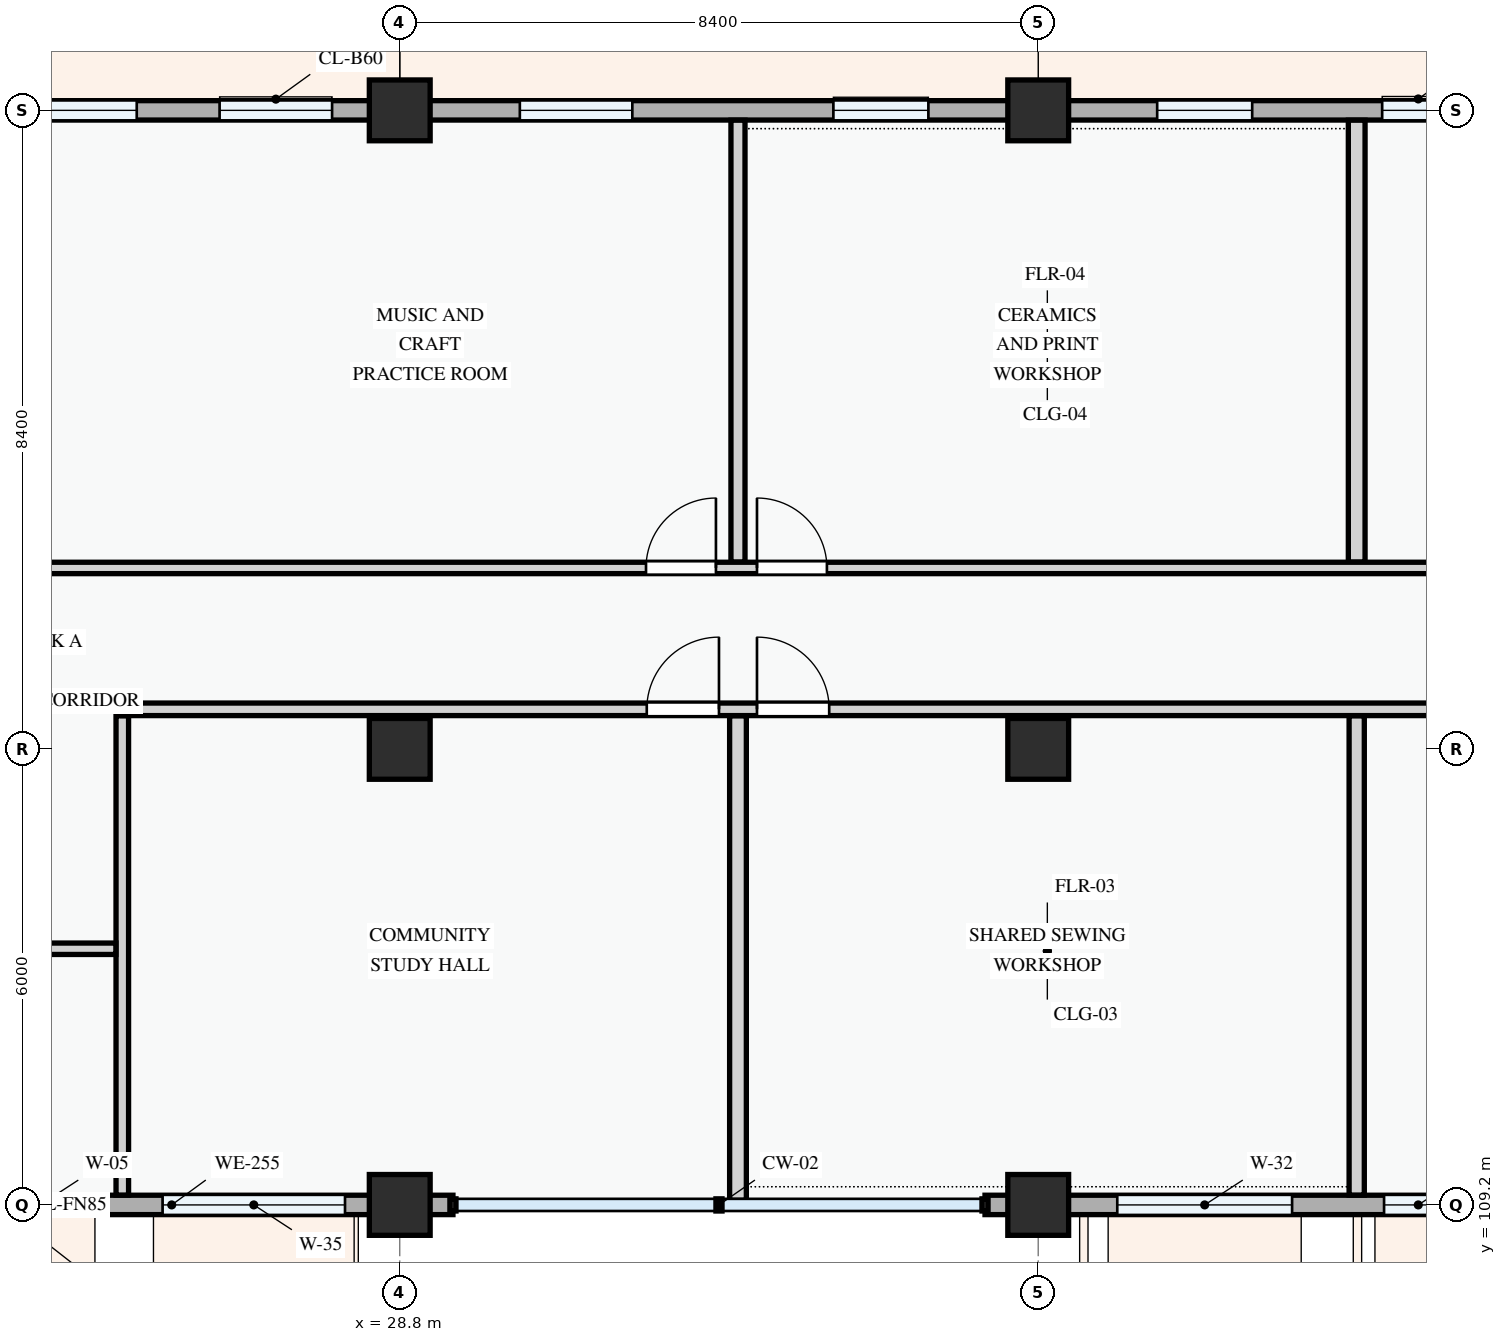
"""IFC4 building model, lengths in metres.
Left out: names, types, materials, properties, quantities, classifications, styles, units other than length and angle.
Written with IfcOpenShell. Run it as: python <this file> out.ifc"""

import sys

from ifc_helpers import new_model, si_unit, direction, frame, frame_2d, origin, origin_2d, place, context, subcontext, project, spatial, rectangle, extrude, element, fill, save


model = new_model("IFC4")
c1 = context("Model", 3, precision=1e-05, world=origin(), true_north=direction((0.0, 1.0)))
c2 = subcontext(c1, "Body", "Model", "MODEL_VIEW")
j1 = project(units=[si_unit("LENGTHUNIT", "METRE"), si_unit("PLANEANGLEUNIT", "RADIAN")], contexts=[c1])
p1 = place(None, origin())
s1 = spatial("IfcSite", under=j1, at=p1, CompositionType="ELEMENT")
p2 = place(p1, origin())
s2 = spatial("IfcBuilding", under=s1, at=p2, CompositionType="ELEMENT")
p3 = place(p2, frame((0.0, 0.0, 4.5)))
s3 = spatial("IfcBuildingStorey", under=s2, at=p3, CompositionType="ELEMENT", Elevation=4.5)
for number, where, z_axis, x_axis in (
    (1, (28.8, 109.2, 0.0), (0.0, 0.0, 1.0), (1.0, 0.0, 0.0)),
    (2, (28.8, 115.2, 0.0), (0.0, 0.0, 1.0), (1.0, 0.0, 0.0)),
    (3, (28.8, 123.6, 0.0), (0.0, 0.0, 1.0), (1.0, 0.0, 0.0)),
    (4, (37.2, 109.2, 0.0), (0.0, 0.0, 1.0), (1.0, 0.0, 0.0)),
    (5, (37.2, 115.2, 0.0), (0.0, 0.0, 1.0), (1.0, 0.0, 0.0)),
    (6, (37.2, 123.6, 0.0), (0.0, 0.0, 1.0), (1.0, 0.0, 0.0)),
):
    element("IfcColumn", number, at=place(p3, frame(where, z_axis=z_axis, x_axis=x_axis)), inside=s3, PredefinedType="COLUMN", context=c2, shape_type="SweptSolid", body=[
        extrude(rectangle(XDim=0.8, YDim=0.8, at=origin_2d()), origin(), (0.0, 0.0, 1.0), 3.6),
    ])
p4 = place(p3, frame((22.8, 109.2, 0.0), z_axis=(0.0, 0.0, 1.0), x_axis=(1.0, 0.0, 0.0)))
e7 = element("IfcWall", 7, at=p4, inside=s3, PredefinedType="STANDARD", context=c2, shape_type="SweptSolid", body=[
    extrude(rectangle(XDim=6.0, YDim=0.255, at=frame_2d((3.0, 0.0))), origin(), (0.0, 0.0, 1.0), 2.775),
])
p5 = place(p4, frame((0.67, 0.0, 0.78)))
e8 = element("IfcOpeningElement", 8, at=p5, cuts=e7, PredefinedType="OPENING", context=c2, shape_type="SweptSolid", body=[
    extrude(rectangle(XDim=1.2, YDim=1.5, at=frame_2d((0.6, 0.75))), frame((0.0, 0.137, 0.0), z_axis=(0.0, -1.0, 0.0), x_axis=(1.0, 0.0, 0.0)), (0.0, 0.0, 1.0), 0.275),
])
p6 = place(p4, frame((2.88, 0.0, 0.78)))
e9 = element("IfcOpeningElement", 9, at=p6, cuts=e7, PredefinedType="OPENING", context=c2, shape_type="SweptSolid", body=[
    extrude(rectangle(XDim=2.4, YDim=1.85, at=frame_2d((1.2, 0.925))), frame((0.0, 0.137, 0.0), z_axis=(0.0, -1.0, 0.0), x_axis=(1.0, 0.0, 0.0)), (0.0, 0.0, 1.0), 0.275),
])
for number, where, z_axis, x_axis in (
    (10, (28.8, 109.2, 0.0), (0.0, 0.0, 1.0), (1.0, 0.0, 0.0)),
    (11, (36.5, 109.2, 0.0), (0.0, 0.0, 1.0), (1.0, 0.0, 0.0)),
):
    element("IfcWall", number, at=place(p3, frame(where, z_axis=z_axis, x_axis=x_axis)), inside=s3, PredefinedType="STANDARD", context=c2, shape_type="SweptSolid", body=[
        extrude(rectangle(XDim=0.7, YDim=0.255, at=frame_2d((0.35, 0.0))), origin(), (0.0, 0.0, 1.0), 2.675),
    ])
p7 = place(p3, frame((37.2, 109.2, 0.0), z_axis=(0.0, 0.0, 1.0), x_axis=(1.0, 0.0, 0.0)))
e12 = element("IfcWall", 12, at=p7, inside=s3, PredefinedType="STANDARD", context=c2, shape_type="SweptSolid", body=[
    extrude(rectangle(XDim=6.0, YDim=0.255, at=frame_2d((3.0, 0.0))), origin(), (0.0, 0.0, 1.0), 2.775),
])
p8 = place(p7, frame((1.04, 0.0, 0.78)))
e13 = element("IfcOpeningElement", 13, at=p8, cuts=e12, PredefinedType="OPENING", context=c2, shape_type="SweptSolid", body=[
    extrude(rectangle(XDim=2.3, YDim=1.7, at=frame_2d((1.15, 0.85))), frame((0.0, 0.137, 0.0), z_axis=(0.0, -1.0, 0.0), x_axis=(1.0, 0.0, 0.0)), (0.0, 0.0, 1.0), 0.275),
])
p9 = place(p7, frame((4.55, 0.0, 0.78)))
e14 = element("IfcOpeningElement", 14, at=p9, cuts=e12, PredefinedType="OPENING", context=c2, shape_type="SweptSolid", body=[
    extrude(rectangle(XDim=0.9, YDim=1.2, at=frame_2d((0.45, 0.6))), frame((0.0, 0.137, 0.0), z_axis=(0.0, -1.0, 0.0), x_axis=(1.0, 0.0, 0.0)), (0.0, 0.0, 1.0), 0.275),
])
p10 = place(p3, frame((43.2, 123.6, 0.0), z_axis=(0.0, 0.0, 1.0), x_axis=(-1.0, 0.0, 0.0)))
e15 = element("IfcWall", 15, at=p10, inside=s3, PredefinedType="STANDARD", context=c2, shape_type="SweptSolid", body=[
    extrude(rectangle(XDim=6.0, YDim=0.255, at=frame_2d((3.0, 0.0))), origin(), (0.0, 0.0, 1.0), 2.775),
])
p11 = place(p10, frame((0.525, 0.0, 0.78)))
e16 = element("IfcOpeningElement", 16, at=p11, cuts=e15, PredefinedType="OPENING", context=c2, shape_type="SweptSolid", body=[
    extrude(rectangle(XDim=0.95, YDim=1.15, at=frame_2d((0.475, 0.575))), frame((0.0, 0.137, 0.0), z_axis=(0.0, -1.0, 0.0), x_axis=(1.0, 0.0, 0.0)), (0.0, 0.0, 1.0), 0.275),
])
p12 = place(p10, frame((3.185, 0.0, 0.78)))
e17 = element("IfcOpeningElement", 17, at=p12, cuts=e15, PredefinedType="OPENING", context=c2, shape_type="SweptSolid", body=[
    extrude(rectangle(XDim=1.25, YDim=1.45, at=frame_2d((0.625, 0.725))), frame((0.0, 0.137, 0.0), z_axis=(0.0, -1.0, 0.0), x_axis=(1.0, 0.0, 0.0)), (0.0, 0.0, 1.0), 0.275),
])
p13 = place(p3, frame((37.2, 123.6, 0.0), z_axis=(0.0, 0.0, 1.0), x_axis=(-1.0, 0.0, 0.0)))
e18 = element("IfcWall", 18, at=p13, inside=s3, PredefinedType="STANDARD", context=c2, shape_type="SweptSolid", body=[
    extrude(rectangle(XDim=8.4, YDim=0.255, at=frame_2d((4.2, 0.0))), origin(), (0.0, 0.0, 1.0), 2.675),
])
p14 = place(p13, frame((1.445, 0.0, 0.78)))
e19 = element("IfcOpeningElement", 19, at=p14, cuts=e18, PredefinedType="OPENING", context=c2, shape_type="SweptSolid", body=[
    extrude(rectangle(XDim=1.25, YDim=1.3, at=frame_2d((0.625, 0.65))), frame((0.0, 0.137, 0.0), z_axis=(0.0, -1.0, 0.0), x_axis=(1.0, 0.0, 0.0)), (0.0, 0.0, 1.0), 0.275),
])
p15 = place(p13, frame((5.34, 0.0, 0.78)))
e20 = element("IfcOpeningElement", 20, at=p15, cuts=e18, PredefinedType="OPENING", context=c2, shape_type="SweptSolid", body=[
    extrude(rectangle(XDim=1.48, YDim=1.52, at=frame_2d((0.74, 0.76))), frame((0.0, 0.137, 0.0), z_axis=(0.0, -1.0, 0.0), x_axis=(1.0, 0.0, 0.0)), (0.0, 0.0, 1.0), 0.275),
])
p16 = place(p3, frame((28.8, 123.6, 0.0), z_axis=(0.0, 0.0, 1.0), x_axis=(-1.0, 0.0, 0.0)))
e21 = element("IfcWall", 21, at=p16, inside=s3, PredefinedType="STANDARD", context=c2, shape_type="SweptSolid", body=[
    extrude(rectangle(XDim=6.0, YDim=0.255, at=frame_2d((3.0, 0.0))), origin(), (0.0, 0.0, 1.0), 2.775),
])
p17 = place(p16, frame((0.89, 0.0, 0.78)))
e22 = element("IfcOpeningElement", 22, at=p17, cuts=e21, PredefinedType="OPENING", context=c2, shape_type="SweptSolid", body=[
    extrude(rectangle(XDim=1.48, YDim=1.52, at=frame_2d((0.74, 0.76))), frame((0.0, 0.137, 0.0), z_axis=(0.0, -1.0, 0.0), x_axis=(1.0, 0.0, 0.0)), (0.0, 0.0, 1.0), 0.275),
])
p18 = place(p16, frame((3.46, 0.0, 0.78)))
e23 = element("IfcOpeningElement", 23, at=p18, cuts=e21, PredefinedType="OPENING", context=c2, shape_type="SweptSolid", body=[
    extrude(rectangle(XDim=1.82, YDim=1.46, at=frame_2d((0.91, 0.73))), frame((0.0, 0.137, 0.0), z_axis=(0.0, -1.0, 0.0), x_axis=(1.0, 0.0, 0.0)), (0.0, 0.0, 1.0), 0.275),
])
p19 = place(p3, frame((25.15, 109.33, 0.0), z_axis=(0.0, 0.0, 1.0), x_axis=(0.0, 1.0, 0.0)))
e24 = element("IfcWall", 24, at=p19, inside=s3, PredefinedType="PARTITIONING", context=c2, shape_type="SweptSolid", body=[
    extrude(rectangle(XDim=6.306, YDim=0.165, at=frame_2d((3.153, 0.0))), origin(), (0.0, 0.0, 1.0), 3.3),
])
p20 = place(p3, frame((22.66, 112.57, 0.0), z_axis=(0.0, 0.0, 1.0), x_axis=(1.0, 0.0, 0.0)))
e25 = element("IfcWall", 25, at=p20, inside=s3, PredefinedType="PARTITIONING", context=c2, shape_type="SweptSolid", body=[
    extrude(rectangle(XDim=2.406, YDim=0.15, at=frame_2d((1.203, 0.0))), origin(), (0.0, 0.0, 1.0), 3.3),
])
p21 = place(p3, frame((33.25, 109.26, 0.0), z_axis=(0.0, 0.0, 1.0), x_axis=(0.0, 1.0, 0.0)))
e26 = element("IfcWall", 26, at=p21, inside=s3, PredefinedType="PARTITIONING", context=c2, shape_type="SweptSolid", body=[
    extrude(rectangle(XDim=6.375, YDim=0.22, at=frame_2d((3.188, 0.0))), origin(), (0.0, 0.0, 1.0), 2.885),
])
p22 = place(p3, frame((33.25, 117.657, 0.0), z_axis=(0.0, 0.0, 1.0), x_axis=(0.0, 1.0, 0.0)))
e27 = element("IfcWall", 27, at=p22, inside=s3, PredefinedType="PARTITIONING", context=c2, shape_type="SweptSolid", body=[
    extrude(rectangle(XDim=5.813, YDim=0.185, at=frame_2d((2.907, 0.0))), origin(), (0.0, 0.0, 1.0), 2.885),
])
p23 = place(p3, frame((41.39, 109.33, 0.0), z_axis=(0.0, 0.0, 1.0), x_axis=(0.0, 1.0, 0.0)))
e28 = element("IfcWall", 28, at=p23, inside=s3, PredefinedType="PARTITIONING", context=c2, shape_type="SweptSolid", body=[
    extrude(rectangle(XDim=6.306, YDim=0.2, at=frame_2d((3.153, 0.0))), origin(), (0.0, 0.0, 1.0), 3.3),
])
p24 = place(p3, frame((41.39, 117.657, 0.0), z_axis=(0.0, 0.0, 1.0), x_axis=(0.0, 1.0, 0.0)))
e29 = element("IfcWall", 29, at=p24, inside=s3, PredefinedType="PARTITIONING", context=c2, shape_type="SweptSolid", body=[
    extrude(rectangle(XDim=5.813, YDim=0.22, at=frame_2d((2.907, 0.0))), origin(), (0.0, 0.0, 1.0), 3.3),
])
p25 = place(p3, frame((25.15, 115.72, 0.0), z_axis=(0.0, 0.0, 1.0), x_axis=(1.0, 0.0, 0.0)))
e30 = element("IfcWall", 30, at=p25, inside=s3, PredefinedType="PARTITIONING", context=c2, shape_type="SweptSolid", body=[
    extrude(rectangle(XDim=32.321, YDim=0.165, at=frame_2d((16.16, 0.0))), origin(), (0.0, 0.0, 1.0), 3.3),
])
p26 = place(p25, frame((6.9, 0.0, 0.0)))
e31 = element("IfcOpeningElement", 31, at=p26, cuts=e30, PredefinedType="OPENING", context=c2, shape_type="SweptSolid", body=[
    extrude(rectangle(XDim=0.95, YDim=2.1, at=frame_2d((0.475, 1.05))), frame((0.0, 0.093, 0.0), z_axis=(0.0, -1.0, 0.0), x_axis=(1.0, 0.0, 0.0)), (0.0, 0.0, 1.0), 0.185),
])
p27 = place(p25, frame((8.35, 0.0, 0.0)))
e32 = element("IfcOpeningElement", 32, at=p27, cuts=e30, PredefinedType="OPENING", context=c2, shape_type="SweptSolid", body=[
    extrude(rectangle(XDim=0.95, YDim=2.1, at=frame_2d((0.475, 1.05))), frame((0.0, 0.093, 0.0), z_axis=(0.0, -1.0, 0.0), x_axis=(1.0, 0.0, 0.0)), (0.0, 0.0, 1.0), 0.185),
])
p28 = place(p25, frame((21.718, 0.0, 0.0)))
e33 = element("IfcOpeningElement", 33, at=p28, cuts=e30, PredefinedType="OPENING", context=c2, shape_type="SweptSolid", body=[
    extrude(rectangle(XDim=0.95, YDim=2.1, at=frame_2d((0.475, 1.05))), frame((0.0, 0.093, 0.0), z_axis=(0.0, -1.0, 0.0), x_axis=(1.0, 0.0, 0.0)), (0.0, 0.0, 1.0), 0.185),
])
p29 = place(p25, frame((29.031, 0.0, 0.0)))
e34 = element("IfcOpeningElement", 34, at=p29, cuts=e30, PredefinedType="OPENING", context=c2, shape_type="SweptSolid", body=[
    extrude(rectangle(XDim=0.95, YDim=2.1, at=frame_2d((0.475, 1.05))), frame((0.0, 0.093, 0.0), z_axis=(0.0, -1.0, 0.0), x_axis=(1.0, 0.0, 0.0)), (0.0, 0.0, 1.0), 0.185),
])
p30 = place(p3, frame((22.66, 117.58, 0.0), z_axis=(0.0, 0.0, 1.0), x_axis=(1.0, 0.0, 0.0)))
e35 = element("IfcWall", 35, at=p30, inside=s3, PredefinedType="PARTITIONING", context=c2, shape_type="SweptSolid", body=[
    extrude(rectangle(XDim=34.88, YDim=0.15, at=frame_2d((17.44, 0.0))), origin(), (0.0, 0.0, 1.0), 3.3),
])
p31 = place(p30, frame((9.38, 0.0, 0.0)))
e36 = element("IfcOpeningElement", 36, at=p31, cuts=e35, PredefinedType="OPENING", context=c2, shape_type="SweptSolid", body=[
    extrude(rectangle(XDim=0.92, YDim=2.1, at=frame_2d((0.46, 1.05))), frame((0.0, 0.085, 0.0), z_axis=(0.0, -1.0, 0.0), x_axis=(1.0, 0.0, 0.0)), (0.0, 0.0, 1.0), 0.17),
])
p32 = place(p30, frame((10.84, 0.0, 0.0)))
e37 = element("IfcOpeningElement", 37, at=p32, cuts=e35, PredefinedType="OPENING", context=c2, shape_type="SweptSolid", body=[
    extrude(rectangle(XDim=0.92, YDim=2.1, at=frame_2d((0.46, 1.05))), frame((0.0, 0.085, 0.0), z_axis=(0.0, -1.0, 0.0), x_axis=(1.0, 0.0, 0.0)), (0.0, 0.0, 1.0), 0.17),
])
p33 = place(p30, frame((24.2, 0.0, 0.0)))
e38 = element("IfcOpeningElement", 38, at=p33, cuts=e35, PredefinedType="OPENING", context=c2, shape_type="SweptSolid", body=[
    extrude(rectangle(XDim=0.92, YDim=2.1, at=frame_2d((0.46, 1.05))), frame((0.0, 0.085, 0.0), z_axis=(0.0, -1.0, 0.0), x_axis=(1.0, 0.0, 0.0)), (0.0, 0.0, 1.0), 0.17),
])
p34 = place(p30, frame((31.515, 0.0, 0.0)))
e39 = element("IfcOpeningElement", 39, at=p34, cuts=e35, PredefinedType="OPENING", context=c2, shape_type="SweptSolid", body=[
    extrude(rectangle(XDim=0.92, YDim=2.1, at=frame_2d((0.46, 1.05))), frame((0.0, 0.085, 0.0), z_axis=(0.0, -1.0, 0.0), x_axis=(1.0, 0.0, 0.0)), (0.0, 0.0, 1.0), 0.17),
])
p35 = place(p5, origin())
e40 = element("IfcWindow", 40, at=p35, inside=s3, PartitioningType="SINGLE_PANEL", PredefinedType="WINDOW", context=c2, shape_type="SweptSolid", body=[
    extrude(rectangle(XDim=1.2, YDim=1.5, at=frame_2d((0.6, 0.75))), frame((0.0, 0.03, 0.0), z_axis=(0.0, -1.0, 0.0), x_axis=(1.0, 0.0, 0.0)), (0.0, 0.0, 1.0), 0.06),
])
fill(e8, e40)
p36 = place(p6, origin())
e41 = element("IfcWindow", 41, at=p36, inside=s3, PartitioningType="DOUBLE_PANEL_VERTICAL", PredefinedType="WINDOW", context=c2, shape_type="SweptSolid", body=[
    extrude(rectangle(XDim=2.4, YDim=1.85, at=frame_2d((1.2, 0.925))), frame((0.0, 0.03, 0.0), z_axis=(0.0, -1.0, 0.0), x_axis=(1.0, 0.0, 0.0)), (0.0, 0.0, 1.0), 0.06),
])
fill(e9, e41)
p37 = place(p8, origin())
e42 = element("IfcWindow", 42, at=p37, inside=s3, PartitioningType="DOUBLE_PANEL_VERTICAL", PredefinedType="WINDOW", context=c2, shape_type="SweptSolid", body=[
    extrude(rectangle(XDim=2.3, YDim=1.7, at=frame_2d((1.15, 0.85))), frame((0.0, 0.03, 0.0), z_axis=(0.0, -1.0, 0.0), x_axis=(1.0, 0.0, 0.0)), (0.0, 0.0, 1.0), 0.06),
])
fill(e13, e42)
p38 = place(p9, origin())
e43 = element("IfcWindow", 43, at=p38, inside=s3, PartitioningType="SINGLE_PANEL", PredefinedType="WINDOW", context=c2, shape_type="SweptSolid", body=[
    extrude(rectangle(XDim=0.9, YDim=1.2, at=frame_2d((0.45, 0.6))), frame((0.0, 0.03, 0.0), z_axis=(0.0, -1.0, 0.0), x_axis=(1.0, 0.0, 0.0)), (0.0, 0.0, 1.0), 0.06),
])
fill(e14, e43)
p39 = place(p11, origin())
e44 = element("IfcWindow", 44, at=p39, inside=s3, PartitioningType="SINGLE_PANEL", PredefinedType="WINDOW", context=c2, shape_type="SweptSolid", body=[
    extrude(rectangle(XDim=0.95, YDim=1.15, at=frame_2d((0.475, 0.575))), frame((0.0, 0.03, 0.0), z_axis=(0.0, -1.0, 0.0), x_axis=(1.0, 0.0, 0.0)), (0.0, 0.0, 1.0), 0.06),
])
fill(e16, e44)
p40 = place(p12, origin())
e45 = element("IfcWindow", 45, at=p40, inside=s3, PartitioningType="SINGLE_PANEL", PredefinedType="WINDOW", context=c2, shape_type="SweptSolid", body=[
    extrude(rectangle(XDim=1.25, YDim=1.45, at=frame_2d((0.625, 0.725))), frame((0.0, 0.03, 0.0), z_axis=(0.0, -1.0, 0.0), x_axis=(1.0, 0.0, 0.0)), (0.0, 0.0, 1.0), 0.06),
])
fill(e17, e45)
p41 = place(p14, origin())
e46 = element("IfcWindow", 46, at=p41, inside=s3, PartitioningType="SINGLE_PANEL", PredefinedType="WINDOW", context=c2, shape_type="SweptSolid", body=[
    extrude(rectangle(XDim=1.25, YDim=1.3, at=frame_2d((0.625, 0.65))), frame((0.0, 0.03, 0.0), z_axis=(0.0, -1.0, 0.0), x_axis=(1.0, 0.0, 0.0)), (0.0, 0.0, 1.0), 0.06),
])
fill(e19, e46)
p42 = place(p15, origin())
e47 = element("IfcWindow", 47, at=p42, inside=s3, PartitioningType="SINGLE_PANEL", PredefinedType="WINDOW", context=c2, shape_type="SweptSolid", body=[
    extrude(rectangle(XDim=1.48, YDim=1.52, at=frame_2d((0.74, 0.76))), frame((0.0, 0.03, 0.0), z_axis=(0.0, -1.0, 0.0), x_axis=(1.0, 0.0, 0.0)), (0.0, 0.0, 1.0), 0.06),
])
fill(e20, e47)
p43 = place(p17, origin())
e48 = element("IfcWindow", 48, at=p43, inside=s3, PartitioningType="SINGLE_PANEL", PredefinedType="WINDOW", context=c2, shape_type="SweptSolid", body=[
    extrude(rectangle(XDim=1.48, YDim=1.52, at=frame_2d((0.74, 0.76))), frame((0.0, 0.03, 0.0), z_axis=(0.0, -1.0, 0.0), x_axis=(1.0, 0.0, 0.0)), (0.0, 0.0, 1.0), 0.06),
])
fill(e22, e48)
p44 = place(p18, origin())
e49 = element("IfcWindow", 49, at=p44, inside=s3, PartitioningType="DOUBLE_PANEL_VERTICAL", PredefinedType="WINDOW", context=c2, shape_type="SweptSolid", body=[
    extrude(rectangle(XDim=1.82, YDim=1.46, at=frame_2d((0.91, 0.73))), frame((0.0, 0.03, 0.0), z_axis=(0.0, -1.0, 0.0), x_axis=(1.0, 0.0, 0.0)), (0.0, 0.0, 1.0), 0.06),
])
fill(e23, e49)
p45 = place(p26, origin())
e50 = element("IfcDoor", 50, at=p45, inside=s3, OperationType="SINGLE_SWING_RIGHT", PredefinedType="DOOR", context=c2, shape_type="SweptSolid", body=[
    extrude(rectangle(XDim=0.95, YDim=2.1, at=frame_2d((0.475, 1.05))), frame((0.0, 0.025, 0.0), z_axis=(0.0, -1.0, 0.0), x_axis=(1.0, 0.0, 0.0)), (0.0, 0.0, 1.0), 0.05),
])
fill(e31, e50)
p46 = place(p27, origin())
e51 = element("IfcDoor", 51, at=p46, inside=s3, OperationType="SINGLE_SWING_LEFT", PredefinedType="DOOR", context=c2, shape_type="SweptSolid", body=[
    extrude(rectangle(XDim=0.95, YDim=2.1, at=frame_2d((0.475, 1.05))), frame((0.0, 0.025, 0.0), z_axis=(0.0, -1.0, 0.0), x_axis=(1.0, 0.0, 0.0)), (0.0, 0.0, 1.0), 0.05),
])
fill(e32, e51)
p47 = place(p31, origin())
e52 = element("IfcDoor", 52, at=p47, inside=s3, OperationType="SINGLE_SWING_RIGHT", PredefinedType="DOOR", context=c2, shape_type="SweptSolid", body=[
    extrude(rectangle(XDim=0.92, YDim=2.1, at=frame_2d((0.46, 1.05))), frame((0.0, 0.025, 0.0), z_axis=(0.0, -1.0, 0.0), x_axis=(1.0, 0.0, 0.0)), (0.0, 0.0, 1.0), 0.05),
])
fill(e36, e52)
p48 = place(p32, origin())
e53 = element("IfcDoor", 53, at=p48, inside=s3, OperationType="SINGLE_SWING_LEFT", PredefinedType="DOOR", context=c2, shape_type="SweptSolid", body=[
    extrude(rectangle(XDim=0.92, YDim=2.1, at=frame_2d((0.46, 1.05))), frame((0.0, 0.025, 0.0), z_axis=(0.0, -1.0, 0.0), x_axis=(1.0, 0.0, 0.0)), (0.0, 0.0, 1.0), 0.05),
])
fill(e37, e53)
save(model, sys.argv[1])
